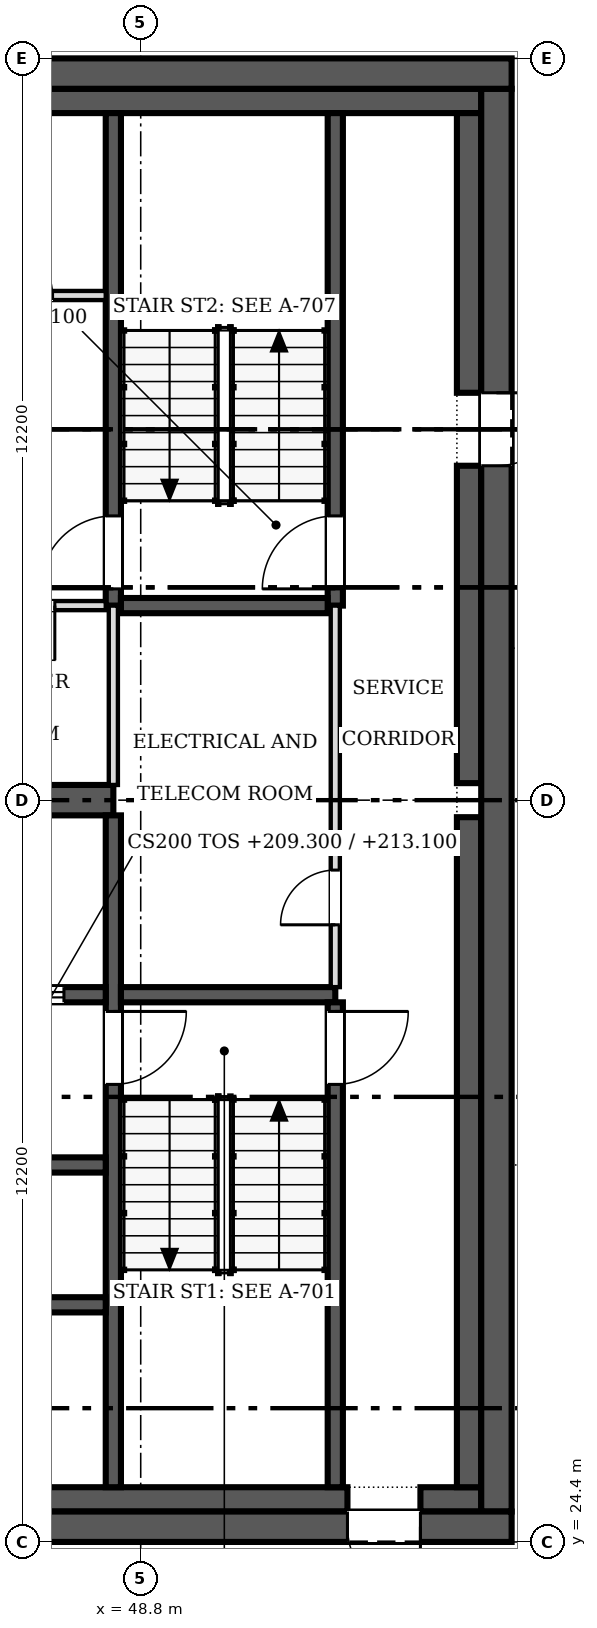
"""IFC4 building model, lengths in metres.
Left out: names, types, materials, properties, quantities, classifications, styles, units other than length and angle.
Written with IfcOpenShell. Run it as: python <this file> out.ifc"""

import sys

from ifc_helpers import new_model, si_unit, direction, frame, frame_2d, origin, place, context, subcontext, project, spatial, rectangle, extrude, source, transform, mapped, element, fill, save


model = new_model("IFC4")
c1 = context("Model", 3, precision=1e-05, world=origin(), true_north=direction((0.0, 1.0)))
c2 = subcontext(c1, "Body", "Model", "MODEL_VIEW")
j1 = project(units=[si_unit("LENGTHUNIT", "METRE"), si_unit("PLANEANGLEUNIT", "RADIAN")], contexts=[c1])
p1 = place(None, origin())
s1 = spatial("IfcSite", under=j1, at=p1, CompositionType="ELEMENT")
p2 = place(p1, origin())
s2 = spatial("IfcBuilding", under=s1, at=p2, CompositionType="ELEMENT")
p3 = place(p2, frame((0.0, 0.0, 209.3)))
s3 = spatial("IfcBuildingStorey", under=s2, at=p3, CompositionType="ELEMENT", Elevation=209.3)
p4 = place(p3, frame((54.9, 24.65, 0.0), z_axis=(0.0, 0.0, 1.0), x_axis=(-1.0, 0.0, 0.0)))
e1 = element("IfcWall", 1, at=p4, inside=s3, PredefinedType="SHEAR", context=c2, shape_type="SweptSolid", body=[
    extrude(rectangle(XDim=24.4, YDim=0.5, at=frame_2d((12.2, 0.0))), origin(), (0.0, 0.0, 1.0), 3.8),
])
m1 = source(origin(), c2, "Body", "SweptSolid", [
    extrude(rectangle(XDim=1.2, YDim=2.1, at=frame_2d((0.6, 1.05))), frame((0.0, 0.26, 0.0), z_axis=(0.0, -1.0, 0.0), x_axis=(1.0, 0.0, 0.0)), (0.0, 0.0, 1.0), 0.52),
])
p5 = place(p4, frame((1.5, 0.0, 0.0)))
e2 = element("IfcOpeningElement", 2, at=p5, cuts=e1, PredefinedType="OPENING", context=c2, shape_type="MappedRepresentation", body=[
    mapped(m1, transform((0.0, 0.0, 0.0), scale=1.0)),
])
p6 = place(p3, frame((30.5, 48.55, 0.0), z_axis=(0.0, 0.0, 1.0), x_axis=(1.0, 0.0, 0.0)))
e3 = element("IfcWall", 3, at=p6, inside=s3, PredefinedType="SHEAR", context=c2, shape_type="SweptSolid", body=[
    extrude(rectangle(XDim=24.4, YDim=0.5, at=frame_2d((12.2, 0.0))), origin(), (0.0, 0.0, 1.0), 3.8),
])
p7 = place(p3, frame((54.65, 48.3, 0.0), z_axis=(0.0, 0.0, 1.0), x_axis=(0.0, -1.0, 0.0)))
e4 = element("IfcWall", 4, at=p7, inside=s3, PredefinedType="SHEAR", context=c2, shape_type="SweptSolid", body=[
    extrude(rectangle(XDim=23.4, YDim=0.5, at=frame_2d((11.7, 0.0))), origin(), (0.0, 0.0, 1.0), 3.8),
])
p8 = place(p7, frame((5.0, 0.0, 0.0)))
e5 = element("IfcOpeningElement", 5, at=p8, cuts=e4, PredefinedType="OPENING", context=c2, shape_type="MappedRepresentation", body=[
    mapped(m1, transform((0.0, 0.0, 0.0), scale=1.0)),
])
p9 = place(p3, frame((31.0, 25.1, 0.0), z_axis=(0.0, 0.0, 1.0), x_axis=(1.0, 0.0, 0.0)))
e6 = element("IfcWall", 6, at=p9, inside=s3, PredefinedType="SOLIDWALL", context=c2, shape_type="SweptSolid", body=[
    extrude(rectangle(XDim=21.2, YDim=0.4, at=frame_2d((10.6, 0.0))), origin(), (0.0, 0.0, 1.0), 3.8),
])
p10 = place(p3, frame((53.4, 25.1, 0.0), z_axis=(0.0, 0.0, 1.0), x_axis=(1.0, 0.0, 0.0)))
e7 = element("IfcWall", 7, at=p10, inside=s3, PredefinedType="SOLIDWALL", context=c2, shape_type="SweptSolid", body=[
    extrude(rectangle(XDim=1.0, YDim=0.4, at=frame_2d((0.5, 0.0))), origin(), (0.0, 0.0, 1.0), 3.8),
])
p11 = place(p3, frame((31.0, 48.1, 0.0), z_axis=(0.0, 0.0, 1.0), x_axis=(1.0, 0.0, 0.0)))
e8 = element("IfcWall", 8, at=p11, inside=s3, PredefinedType="SOLIDWALL", context=c2, shape_type="SweptSolid", body=[
    extrude(rectangle(XDim=23.4, YDim=0.4, at=frame_2d((11.7, 0.0))), origin(), (0.0, 0.0, 1.0), 3.8),
])
p12 = place(p3, frame((54.2, 25.3, 0.0), z_axis=(0.0, 0.0, 1.0), x_axis=(0.0, 1.0, 0.0)))
e9 = element("IfcWall", 9, at=p12, inside=s3, PredefinedType="SOLIDWALL", context=c2, shape_type="SweptSolid", body=[
    extrude(rectangle(XDim=11.02, YDim=0.4, at=frame_2d((5.51, 0.0))), origin(), (0.0, 0.0, 1.0), 3.8),
])
p13 = place(p3, frame((54.2, 36.88, 0.0), z_axis=(0.0, 0.0, 1.0), x_axis=(0.0, 1.0, 0.0)))
e10 = element("IfcWall", 10, at=p13, inside=s3, PredefinedType="SOLIDWALL", context=c2, shape_type="SweptSolid", body=[
    extrude(rectangle(XDim=5.22, YDim=0.4, at=frame_2d((2.61, 0.0))), origin(), (0.0, 0.0, 1.0), 3.8),
])
p14 = place(p3, frame((54.2, 43.3, 0.0), z_axis=(0.0, 0.0, 1.0), x_axis=(0.0, 1.0, 0.0)))
e11 = element("IfcWall", 11, at=p14, inside=s3, PredefinedType="SOLIDWALL", context=c2, shape_type="SweptSolid", body=[
    extrude(rectangle(XDim=4.6, YDim=0.4, at=frame_2d((2.3, 0.0))), origin(), (0.0, 0.0, 1.0), 3.8),
])
p15 = place(p3, frame((31.4, 36.6, 0.0), z_axis=(0.0, 0.0, 1.0), x_axis=(1.0, 0.0, 0.0)))
e12 = element("IfcWall", 12, at=p15, inside=s3, PredefinedType="SHEAR", context=c2, shape_type="SweptSolid", body=[
    extrude(rectangle(XDim=16.95, YDim=0.5, at=frame_2d((8.475, 0.0))), origin(), (0.0, 0.0, 1.0), 3.8),
])
p16 = place(p3, frame((48.35, 36.35, 0.0), z_axis=(0.0, 0.0, 1.0), x_axis=(0.0, -1.0, 0.0)))
e13 = element("IfcWall", 13, at=p16, inside=s3, PredefinedType="SOLIDWALL", context=c2, shape_type="SweptSolid", body=[
    extrude(rectangle(XDim=11.05, YDim=0.25, at=frame_2d((5.525, 0.0))), origin(), (0.0, 0.0, 1.0), 3.8),
])
m2 = source(origin(), c2, "Body", "SweptSolid", [
    extrude(rectangle(XDim=1.2, YDim=2.1, at=frame_2d((0.6, 1.05))), frame((0.0, 0.135, 0.0), z_axis=(0.0, -1.0, 0.0), x_axis=(1.0, 0.0, 0.0)), (0.0, 0.0, 1.0), 0.27),
])
p17 = place(p16, frame((3.225, 0.0, 0.0)))
e14 = element("IfcOpeningElement", 14, at=p17, cuts=e13, PredefinedType="OPENING", context=c2, shape_type="MappedRepresentation", body=[
    mapped(m2, transform((0.0, 0.0, 0.0), scale=1.0)),
])
p18 = place(p3, frame((48.225, 33.4, 0.0), z_axis=(0.0, 0.0, 1.0), x_axis=(-1.0, 0.0, 0.0)))
e15 = element("IfcWall", 15, at=p18, inside=s3, PredefinedType="SOLIDWALL", context=c2, shape_type="SweptSolid", body=[
    extrude(rectangle(XDim=5.275, YDim=0.25, at=frame_2d((2.638, 0.0))), origin(), (0.0, 0.0, 1.0), 3.8),
])
p19 = place(p18, frame((3.512, 0.0, 0.0)))
e16 = element("IfcOpeningElement", 16, at=p19, cuts=e15, PredefinedType="OPENING", context=c2, shape_type="MappedRepresentation", body=[
    mapped(m2, transform((0.0, 0.0, 0.0), scale=1.0)),
])
p20 = place(p18, frame((0.688, 0.0, 0.0)))
e17 = element("IfcOpeningElement", 17, at=p20, cuts=e15, PredefinedType="OPENING", context=c2, shape_type="MappedRepresentation", body=[
    mapped(m2, transform((0.0, 0.0, 0.0), scale=1.0)),
])
p21 = place(p3, frame((48.475, 33.4, 0.0), z_axis=(0.0, 0.0, 1.0), x_axis=(1.0, 0.0, 0.0)))
e18 = element("IfcWall", 18, at=p21, inside=s3, PredefinedType="SOLIDWALL", context=c2, shape_type="SweptSolid", body=[
    extrude(rectangle(XDim=3.525, YDim=0.25, at=frame_2d((1.762, 0.0))), origin(), (0.0, 0.0, 1.0), 3.8),
])
p22 = place(p3, frame((48.35, 47.9, 0.0), z_axis=(0.0, 0.0, 1.0), x_axis=(0.0, -1.0, 0.0)))
e19 = element("IfcWall", 19, at=p22, inside=s3, PredefinedType="SOLIDWALL", context=c2, shape_type="SweptSolid", body=[
    extrude(rectangle(XDim=8.1, YDim=0.25, at=frame_2d((4.05, 0.0))), origin(), (0.0, 0.0, 1.0), 3.8),
])
p23 = place(p22, frame((6.625, 0.0, 0.0)))
e20 = element("IfcOpeningElement", 20, at=p23, cuts=e19, PredefinedType="OPENING", context=c2, shape_type="MappedRepresentation", body=[
    mapped(m2, transform((0.0, 0.0, 0.0), scale=1.0)),
])
p24 = place(p3, frame((52.0, 25.3, 0.0), z_axis=(0.0, 0.0, 1.0), x_axis=(0.0, 1.0, 0.0)))
e21 = element("IfcWall", 21, at=p24, inside=s3, PredefinedType="SOLIDWALL", context=c2, shape_type="SweptSolid", body=[
    extrude(rectangle(XDim=7.975, YDim=0.25, at=frame_2d((3.987, 0.0))), origin(), (0.0, 0.0, 1.0), 3.8),
])
p25 = place(p24, frame((6.625, 0.0, 0.0)))
e22 = element("IfcOpeningElement", 22, at=p25, cuts=e21, PredefinedType="OPENING", context=c2, shape_type="MappedRepresentation", body=[
    mapped(m2, transform((0.0, 0.0, 0.0), scale=1.0)),
])
p26 = place(p3, frame((52.0, 39.8, 0.0), z_axis=(0.0, 0.0, 1.0), x_axis=(0.0, 1.0, 0.0)))
e23 = element("IfcWall", 23, at=p26, inside=s3, PredefinedType="SOLIDWALL", context=c2, shape_type="SweptSolid", body=[
    extrude(rectangle(XDim=8.1, YDim=0.25, at=frame_2d((4.05, 0.0))), origin(), (0.0, 0.0, 1.0), 3.8),
])
p27 = place(p26, frame((0.275, 0.0, 0.0)))
e24 = element("IfcOpeningElement", 24, at=p27, cuts=e23, PredefinedType="OPENING", context=c2, shape_type="MappedRepresentation", body=[
    mapped(m2, transform((0.0, 0.0, 0.0), scale=1.0)),
])
for number, where, z_axis, x_axis in (
    (25, (42.95, 28.3, 0.0), (0.0, 0.0, 1.0), (1.0, 0.0, 0.0)),
    (26, (42.95, 30.6, 0.0), (0.0, 0.0, 1.0), (1.0, 0.0, 0.0)),
):
    element("IfcWall", number, at=place(p3, frame(where, z_axis=z_axis, x_axis=x_axis)), inside=s3, PredefinedType="SOLIDWALL", context=c2, shape_type="SweptSolid", body=[
        extrude(rectangle(XDim=5.275, YDim=0.25, at=frame_2d((2.638, 0.0))), origin(), (0.0, 0.0, 1.0), 3.8),
    ])
p28 = place(p3, frame((48.475, 39.8, 0.0), z_axis=(0.0, 0.0, 1.0), x_axis=(1.0, 0.0, 0.0)))
e27 = element("IfcWall", 27, at=p28, inside=s3, PredefinedType="SOLIDWALL", context=c2, shape_type="SweptSolid", body=[
    extrude(rectangle(XDim=3.4, YDim=0.25, at=frame_2d((1.7, 0.0))), origin(), (0.0, 0.0, 1.0), 3.8),
])
p29 = place(p3, frame((52.0, 33.525, 0.0), z_axis=(0.0, 0.0, 1.0), x_axis=(0.0, 1.0, 0.0)))
e28 = element("IfcWall", 28, at=p29, inside=s3, PredefinedType="PARTITIONING", context=c2, shape_type="SweptSolid", body=[
    extrude(rectangle(XDim=6.275, YDim=0.15, at=frame_2d((3.138, 0.0))), origin(), (0.0, 0.0, 1.0), 3.6),
])
m3 = source(origin(), c2, "Body", "SweptSolid", [
    extrude(rectangle(XDim=0.9, YDim=2.1, at=frame_2d((0.45, 1.05))), frame((0.0, 0.085, 0.0), z_axis=(0.0, -1.0, 0.0), x_axis=(1.0, 0.0, 0.0)), (0.0, 0.0, 1.0), 0.17),
])
p30 = place(p29, frame((1.025, 0.0, 0.0)))
e29 = element("IfcOpeningElement", 29, at=p30, cuts=e28, PredefinedType="OPENING", context=c2, shape_type="MappedRepresentation", body=[
    mapped(m3, transform((0.0, 0.0, 0.0), scale=1.0)),
])
p31 = place(p3, frame((48.35, 36.85, 0.0), z_axis=(0.0, 0.0, 1.0), x_axis=(0.0, 1.0, 0.0)))
e30 = element("IfcWall", 30, at=p31, inside=s3, PredefinedType="PARTITIONING", context=c2, shape_type="SweptSolid", body=[
    extrude(rectangle(XDim=2.95, YDim=0.15, at=frame_2d((1.475, 0.0))), origin(), (0.0, 0.0, 1.0), 3.6),
])
p32 = place(p3, frame((48.225, 39.8, 0.0), z_axis=(0.0, 0.0, 1.0), x_axis=(-1.0, 0.0, 0.0)))
e31 = element("IfcWall", 31, at=p32, inside=s3, PredefinedType="PARTITIONING", context=c2, shape_type="SweptSolid", body=[
    extrude(rectangle(XDim=2.625, YDim=0.15, at=frame_2d((1.312, 0.0))), origin(), (0.0, 0.0, 1.0), 3.6),
])
p33 = place(p32, frame((0.837, 0.0, 0.0)))
e32 = element("IfcOpeningElement", 32, at=p33, cuts=e31, PredefinedType="OPENING", context=c2, shape_type="MappedRepresentation", body=[
    mapped(m3, transform((0.0, 0.0, 0.0), scale=1.0)),
])
p34 = place(p3, frame((45.6, 44.9, 0.0), z_axis=(0.0, 0.0, 1.0), x_axis=(1.0, 0.0, 0.0)))
e33 = element("IfcWall", 33, at=p34, inside=s3, PredefinedType="PARTITIONING", context=c2, shape_type="SweptSolid", body=[
    extrude(rectangle(XDim=2.625, YDim=0.15, at=frame_2d((1.312, 0.0))), origin(), (0.0, 0.0, 1.0), 3.6),
])
p35 = place(p34, frame((0.85, 0.0, 0.0)))
e34 = element("IfcOpeningElement", 34, at=p35, cuts=e33, PredefinedType="OPENING", context=c2, shape_type="MappedRepresentation", body=[
    mapped(m3, transform((0.0, 0.0, 0.0), scale=1.0)),
])
m4 = source(origin(), c2, "Body", "SweptSolid", [
    extrude(rectangle(XDim=1.2, YDim=2.1, at=frame_2d((0.6, 1.05))), frame((0.0, 0.025, 0.0), z_axis=(0.0, -1.0, 0.0), x_axis=(1.0, 0.0, 0.0)), (0.0, 0.0, 1.0), 0.05),
])
p36 = place(p5, origin())
e35 = element("IfcDoor", 35, at=p36, inside=s3, OperationType="SINGLE_SWING_LEFT", PredefinedType="DOOR", context=c2, shape_type="MappedRepresentation", body=[
    mapped(m4, transform((0.0, 0.0, 0.0), scale=1.0)),
])
fill(e2, e35)
p37 = place(p8, origin())
e36 = element("IfcDoor", 36, at=p37, inside=s3, OperationType="SINGLE_SWING_LEFT", PredefinedType="DOOR", context=c2, shape_type="MappedRepresentation", body=[
    mapped(m4, transform((0.0, 0.0, 0.0), scale=1.0)),
])
fill(e5, e36)
p38 = place(p17, origin())
e37 = element("IfcDoor", 37, at=p38, inside=s3, OperationType="SINGLE_SWING_LEFT", PredefinedType="DOOR", context=c2, shape_type="MappedRepresentation", body=[
    mapped(m4, transform((0.0, 0.0, 0.0), scale=1.0)),
])
fill(e14, e37)
p39 = place(p20, origin())
e38 = element("IfcDoor", 38, at=p39, inside=s3, OperationType="DOUBLE_DOOR_SLIDING", PredefinedType="DOOR", context=c2, shape_type="MappedRepresentation", body=[
    mapped(m4, transform((0.0, 0.0, 0.0), scale=1.0)),
])
fill(e17, e38)
p40 = place(p23, origin())
e39 = element("IfcDoor", 39, at=p40, inside=s3, OperationType="SINGLE_SWING_RIGHT", PredefinedType="DOOR", context=c2, shape_type="MappedRepresentation", body=[
    mapped(m4, transform((0.0, 0.0, 0.0), scale=1.0)),
])
fill(e20, e39)
p41 = place(p25, origin())
e40 = element("IfcDoor", 40, at=p41, inside=s3, OperationType="SINGLE_SWING_RIGHT", PredefinedType="DOOR", context=c2, shape_type="MappedRepresentation", body=[
    mapped(m4, transform((0.0, 0.0, 0.0), scale=1.0)),
])
fill(e22, e40)
p42 = place(p27, origin())
e41 = element("IfcDoor", 41, at=p42, inside=s3, OperationType="SINGLE_SWING_LEFT", PredefinedType="DOOR", context=c2, shape_type="MappedRepresentation", body=[
    mapped(m4, transform((0.0, 0.0, 0.0), scale=1.0)),
])
fill(e24, e41)
m5 = source(origin(), c2, "Body", "SweptSolid", [
    extrude(rectangle(XDim=0.9, YDim=2.1, at=frame_2d((0.45, 1.05))), frame((0.0, 0.025, 0.0), z_axis=(0.0, -1.0, 0.0), x_axis=(1.0, 0.0, 0.0)), (0.0, 0.0, 1.0), 0.05),
])
p43 = place(p30, origin())
e42 = element("IfcDoor", 42, at=p43, inside=s3, OperationType="SINGLE_SWING_LEFT", PredefinedType="DOOR", context=c2, shape_type="MappedRepresentation", body=[
    mapped(m5, transform((0.0, 0.0, 0.0), scale=1.0)),
])
fill(e29, e42)
p44 = place(p33, origin())
e43 = element("IfcDoor", 43, at=p44, inside=s3, OperationType="SINGLE_SWING_LEFT", PredefinedType="DOOR", context=c2, shape_type="MappedRepresentation", body=[
    mapped(m5, transform((0.0, 0.0, 0.0), scale=1.0)),
])
fill(e32, e43)
save(model, sys.argv[1])
